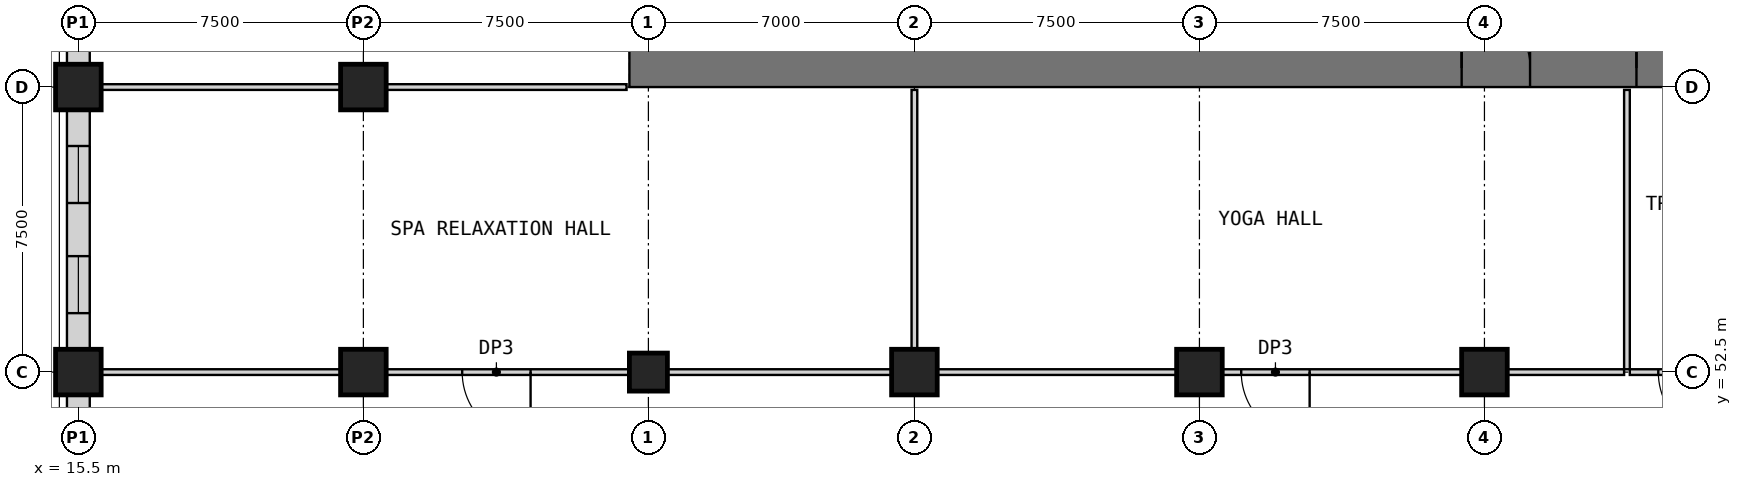
"""IFC4 building model, lengths in metres.
Left out: names, types, materials, properties, quantities, classifications, styles, units other than length and angle.
Written with IfcOpenShell. Run it as: python <this file> out.ifc"""

import sys

from ifc_helpers import new_model, si_unit, direction, frame, frame_2d, origin, origin_2d, place, context, subcontext, project, spatial, rectangle, extrude, element, fill, save


model = new_model("IFC4")
c1 = context("Model", 3, precision=1e-05, world=origin(), true_north=direction((0.0, 1.0)))
c2 = subcontext(c1, "Body", "Model", "MODEL_VIEW")
j1 = project(units=[si_unit("LENGTHUNIT", "METRE"), si_unit("PLANEANGLEUNIT", "RADIAN")], contexts=[c1])
p1 = place(None, origin())
s1 = spatial("IfcSite", under=j1, at=p1, CompositionType="ELEMENT")
p2 = place(p1, origin())
s2 = spatial("IfcBuilding", under=s1, at=p2, CompositionType="ELEMENT")
p3 = place(p2, frame((0.0, 0.0, 29.0)))
s3 = spatial("IfcBuildingStorey", under=s2, at=p3, CompositionType="ELEMENT", Elevation=29.0)
p4 = place(p3, frame((30.5, 52.5, 0.0), z_axis=(0.0, 0.0, 1.0), x_axis=(1.0, 0.0, 0.0)))
e1 = element("IfcColumn", 1, at=p4, inside=s3, PredefinedType="COLUMN", context=c2, shape_type="SweptSolid", body=[
    extrude(rectangle(XDim=1.0, YDim=1.0, at=origin_2d()), origin(), (0.0, 0.0, 1.0), 5.0),
])
for number, where, z_axis, x_axis in (
    (2, (37.5, 52.5, 0.0), (0.0, 0.0, 1.0), (1.0, 0.0, 0.0)),
    (3, (45.0, 52.5, 0.0), (0.0, 0.0, 1.0), (1.0, 0.0, 0.0)),
    (4, (52.5, 52.5, 0.0), (0.0, 0.0, 1.0), (1.0, 0.0, 0.0)),
    (5, (15.5, 52.5, 0.0), (0.0, 0.0, 1.0), (1.0, 0.0, 0.0)),
    (6, (15.5, 60.0, 0.0), (0.0, 0.0, 1.0), (1.0, 0.0, 0.0)),
    (7, (23.0, 52.5, 0.0), (0.0, 0.0, 1.0), (1.0, 0.0, 0.0)),
    (8, (23.0, 60.0, 0.0), (0.0, 0.0, 1.0), (1.0, 0.0, 0.0)),
):
    element("IfcColumn", number, at=place(p3, frame(where, z_axis=z_axis, x_axis=x_axis)), inside=s3, PredefinedType="COLUMN", context=c2, shape_type="SweptSolid", body=[
        extrude(rectangle(XDim=1.2, YDim=1.2, at=origin_2d()), origin(), (0.0, 0.0, 1.0), 5.0),
    ])
p5 = place(p3, frame((30.0, 60.5, 0.0), z_axis=(0.0, 0.0, 1.0), x_axis=(1.0, 0.0, 0.0)))
e9 = element("IfcWall", 9, at=p5, inside=s3, PredefinedType="SHEAR", context=c2, shape_type="SweptSolid", body=[
    extrude(rectangle(XDim=30.0, YDim=1.0, at=frame_2d((15.0, 0.0))), origin(), (0.0, 0.0, 1.0), 5.0),
])
p6 = place(p5, frame((21.9, 0.0, 0.0)))
e10 = element("IfcOpeningElement", 10, at=p6, cuts=e9, PredefinedType="OPENING", context=c2, shape_type="SweptSolid", body=[
    extrude(rectangle(XDim=1.8, YDim=2.1, at=frame_2d((0.9, 1.05))), frame((0.0, 0.51, 0.0), z_axis=(0.0, -1.0, 0.0), x_axis=(1.0, 0.0, 0.0)), (0.0, 0.0, 1.0), 1.02),
])
p7 = place(p5, frame((26.5, 0.0, 0.0)))
e11 = element("IfcOpeningElement", 11, at=p7, cuts=e9, PredefinedType="OPENING", context=c2, shape_type="SweptSolid", body=[
    extrude(rectangle(XDim=1.2, YDim=2.1, at=frame_2d((0.6, 1.05))), frame((0.0, 0.51, 0.0), z_axis=(0.0, -1.0, 0.0), x_axis=(1.0, 0.0, 0.0)), (0.0, 0.0, 1.0), 1.02),
])
p8 = place(p3, frame((16.1, 52.5, 0.0), z_axis=(0.0, 0.0, 1.0), x_axis=(1.0, 0.0, 0.0)))
e12 = element("IfcWall", 12, at=p8, inside=s3, PredefinedType="PARTITIONING", context=c2, shape_type="SweptSolid", body=[
    extrude(rectangle(XDim=6.3, YDim=0.15, at=frame_2d((3.15, 0.0))), origin(), (0.0, 0.0, 1.0), 4.7),
])
p9 = place(p3, frame((30.0, 52.5, 0.0), z_axis=(0.0, 0.0, 1.0), x_axis=(-1.0, 0.0, 0.0)))
e13 = element("IfcWall", 13, at=p9, inside=s3, PredefinedType="PARTITIONING", context=c2, shape_type="SweptSolid", body=[
    extrude(rectangle(XDim=6.4, YDim=0.15, at=frame_2d((3.2, 0.0))), origin(), (0.0, 0.0, 1.0), 4.7),
])
p10 = place(p9, frame((2.6, 0.0, 0.0)))
e14 = element("IfcOpeningElement", 14, at=p10, cuts=e13, PredefinedType="OPENING", context=c2, shape_type="SweptSolid", body=[
    extrude(rectangle(XDim=1.8, YDim=2.4, at=frame_2d((0.9, 1.2))), frame((0.0, 0.085, 0.0), z_axis=(0.0, -1.0, 0.0), x_axis=(1.0, 0.0, 0.0)), (0.0, 0.0, 1.0), 0.17),
])
p11 = place(p3, frame((31.0, 52.5, 0.0), z_axis=(0.0, 0.0, 1.0), x_axis=(1.0, 0.0, 0.0)))
e15 = element("IfcWall", 15, at=p11, inside=s3, PredefinedType="PARTITIONING", context=c2, shape_type="SweptSolid", body=[
    extrude(rectangle(XDim=5.9, YDim=0.15, at=frame_2d((2.95, 0.0))), origin(), (0.0, 0.0, 1.0), 4.7),
])
p12 = place(p3, frame((38.1, 52.5, 0.0), z_axis=(0.0, 0.0, 1.0), x_axis=(1.0, 0.0, 0.0)))
e16 = element("IfcWall", 16, at=p12, inside=s3, PredefinedType="PARTITIONING", context=c2, shape_type="SweptSolid", body=[
    extrude(rectangle(XDim=6.3, YDim=0.15, at=frame_2d((3.15, 0.0))), origin(), (0.0, 0.0, 1.0), 4.7),
])
p13 = place(p3, frame((51.9, 52.5, 0.0), z_axis=(0.0, 0.0, 1.0), x_axis=(-1.0, 0.0, 0.0)))
e17 = element("IfcWall", 17, at=p13, inside=s3, PredefinedType="PARTITIONING", context=c2, shape_type="SweptSolid", body=[
    extrude(rectangle(XDim=6.3, YDim=0.15, at=frame_2d((3.15, 0.0))), origin(), (0.0, 0.0, 1.0), 4.7),
])
p14 = place(p13, frame((4.0, 0.0, 0.0)))
e18 = element("IfcOpeningElement", 18, at=p14, cuts=e17, PredefinedType="OPENING", context=c2, shape_type="SweptSolid", body=[
    extrude(rectangle(XDim=1.8, YDim=2.4, at=frame_2d((0.9, 1.2))), frame((0.0, 0.085, 0.0), z_axis=(0.0, -1.0, 0.0), x_axis=(1.0, 0.0, 0.0)), (0.0, 0.0, 1.0), 0.17),
])
p15 = place(p3, frame((53.1, 52.5, 0.0), z_axis=(0.0, 0.0, 1.0), x_axis=(1.0, 0.0, 0.0)))
e19 = element("IfcWall", 19, at=p15, inside=s3, PredefinedType="PARTITIONING", context=c2, shape_type="SweptSolid", body=[
    extrude(rectangle(XDim=3.075, YDim=0.15, at=frame_2d((1.538, 0.0))), origin(), (0.0, 0.0, 1.0), 4.7),
])
p16 = place(p3, frame((59.4, 52.5, 0.0), z_axis=(0.0, 0.0, 1.0), x_axis=(-1.0, 0.0, 0.0)))
e20 = element("IfcWall", 20, at=p16, inside=s3, PredefinedType="PARTITIONING", context=c2, shape_type="SweptSolid", body=[
    extrude(rectangle(XDim=3.075, YDim=0.15, at=frame_2d((1.538, 0.0))), origin(), (0.0, 0.0, 1.0), 4.7),
])
p17 = place(p16, frame((0.525, 0.0, 0.0)))
e21 = element("IfcOpeningElement", 21, at=p17, cuts=e20, PredefinedType="OPENING", context=c2, shape_type="SweptSolid", body=[
    extrude(rectangle(XDim=1.8, YDim=2.4, at=frame_2d((0.9, 1.2))), frame((0.0, 0.085, 0.0), z_axis=(0.0, -1.0, 0.0), x_axis=(1.0, 0.0, 0.0)), (0.0, 0.0, 1.0), 0.17),
])
p18 = place(p3, frame((16.1, 60.0, 0.0), z_axis=(0.0, 0.0, 1.0), x_axis=(1.0, 0.0, 0.0)))
e22 = element("IfcWall", 22, at=p18, inside=s3, PredefinedType="PARTITIONING", context=c2, shape_type="SweptSolid", body=[
    extrude(rectangle(XDim=6.3, YDim=0.15, at=frame_2d((3.15, 0.0))), origin(), (0.0, 0.0, 1.0), 4.7),
])
p19 = place(p3, frame((23.6, 60.0, 0.0), z_axis=(0.0, 0.0, 1.0), x_axis=(1.0, 0.0, 0.0)))
e23 = element("IfcWall", 23, at=p19, inside=s3, PredefinedType="PARTITIONING", context=c2, shape_type="SweptSolid", body=[
    extrude(rectangle(XDim=6.325, YDim=0.15, at=frame_2d((3.163, 0.0))), origin(), (0.0, 0.0, 1.0), 4.7),
])
p20 = place(p3, frame((15.5, 46.1, 0.0), z_axis=(0.0, 0.0, 1.0), x_axis=(0.0, 1.0, 0.0)))
e24 = element("IfcWall", 24, at=p20, inside=s3, PredefinedType="PARTITIONING", context=c2, shape_type="SweptSolid", body=[
    extrude(rectangle(XDim=5.8, YDim=0.6, at=frame_2d((2.9, 0.0))), origin(), (0.0, 0.0, 1.0), 4.7),
])
p21 = place(p20, frame((0.816, 0.0, 0.9)))
e25 = element("IfcOpeningElement", 25, at=p21, cuts=e24, PredefinedType="OPENING", context=c2, shape_type="SweptSolid", body=[
    extrude(rectangle(XDim=1.5, YDim=2.8, at=frame_2d((0.75, 1.4))), frame((0.0, 0.31, 0.0), z_axis=(0.0, -1.0, 0.0), x_axis=(1.0, 0.0, 0.0)), (0.0, 0.0, 1.0), 0.62),
])
p22 = place(p20, frame((3.484, 0.0, 0.9)))
e26 = element("IfcOpeningElement", 26, at=p22, cuts=e24, PredefinedType="OPENING", context=c2, shape_type="SweptSolid", body=[
    extrude(rectangle(XDim=1.5, YDim=2.8, at=frame_2d((0.75, 1.4))), frame((0.0, 0.31, 0.0), z_axis=(0.0, -1.0, 0.0), x_axis=(1.0, 0.0, 0.0)), (0.0, 0.0, 1.0), 0.62),
])
p23 = place(p3, frame((15.5, 53.1, 0.0), z_axis=(0.0, 0.0, 1.0), x_axis=(0.0, 1.0, 0.0)))
e27 = element("IfcWall", 27, at=p23, inside=s3, PredefinedType="PARTITIONING", context=c2, shape_type="SweptSolid", body=[
    extrude(rectangle(XDim=6.3, YDim=0.6, at=frame_2d((3.15, 0.0))), origin(), (0.0, 0.0, 1.0), 4.7),
])
p24 = place(p23, frame((0.951, 0.0, 0.9)))
e28 = element("IfcOpeningElement", 28, at=p24, cuts=e27, PredefinedType="OPENING", context=c2, shape_type="SweptSolid", body=[
    extrude(rectangle(XDim=1.5, YDim=2.8, at=frame_2d((0.75, 1.4))), frame((0.0, 0.31, 0.0), z_axis=(0.0, -1.0, 0.0), x_axis=(1.0, 0.0, 0.0)), (0.0, 0.0, 1.0), 0.62),
])
p25 = place(p23, frame((3.849, 0.0, 0.9)))
e29 = element("IfcOpeningElement", 29, at=p25, cuts=e27, PredefinedType="OPENING", context=c2, shape_type="SweptSolid", body=[
    extrude(rectangle(XDim=1.5, YDim=2.8, at=frame_2d((0.75, 1.4))), frame((0.0, 0.31, 0.0), z_axis=(0.0, -1.0, 0.0), x_axis=(1.0, 0.0, 0.0)), (0.0, 0.0, 1.0), 0.62),
])
p26 = place(p3, frame((15.5, 60.6, 0.0), z_axis=(0.0, 0.0, 1.0), x_axis=(0.0, 1.0, 0.0)))
e30 = element("IfcWall", 30, at=p26, inside=s3, PredefinedType="PARTITIONING", context=c2, shape_type="SweptSolid", body=[
    extrude(rectangle(XDim=6.3, YDim=0.6, at=frame_2d((3.15, 0.0))), origin(), (0.0, 0.0, 1.0), 4.7),
])
p27 = place(p26, frame((0.951, 0.0, 0.9)))
e31 = element("IfcOpeningElement", 31, at=p27, cuts=e30, PredefinedType="OPENING", context=c2, shape_type="SweptSolid", body=[
    extrude(rectangle(XDim=1.5, YDim=2.8, at=frame_2d((0.75, 1.4))), frame((0.0, 0.31, 0.0), z_axis=(0.0, -1.0, 0.0), x_axis=(1.0, 0.0, 0.0)), (0.0, 0.0, 1.0), 0.62),
])
p28 = place(p26, frame((3.849, 0.0, 0.9)))
e32 = element("IfcOpeningElement", 32, at=p28, cuts=e30, PredefinedType="OPENING", context=c2, shape_type="SweptSolid", body=[
    extrude(rectangle(XDim=1.5, YDim=2.8, at=frame_2d((0.75, 1.4))), frame((0.0, 0.31, 0.0), z_axis=(0.0, -1.0, 0.0), x_axis=(1.0, 0.0, 0.0)), (0.0, 0.0, 1.0), 0.62),
])
p29 = place(p3, frame((56.25, 52.575, 0.0), z_axis=(0.0, 0.0, 1.0), x_axis=(0.0, 1.0, 0.0)))
e33 = element("IfcWall", 33, at=p29, inside=s3, PredefinedType="PARTITIONING", context=c2, shape_type="SweptSolid", body=[
    extrude(rectangle(XDim=7.35, YDim=0.15, at=frame_2d((3.675, 0.0))), origin(), (0.0, 0.0, 1.0), 4.7),
])
p30 = place(p3, frame((37.5, 53.1, 0.0), z_axis=(0.0, 0.0, 1.0), x_axis=(0.0, 1.0, 0.0)))
e34 = element("IfcWall", 34, at=p30, inside=s3, PredefinedType="PARTITIONING", context=c2, shape_type="SweptSolid", body=[
    extrude(rectangle(XDim=6.825, YDim=0.15, at=frame_2d((3.413, 0.0))), origin(), (0.0, 0.0, 1.0), 4.7),
])
p31 = place(p6, origin())
e35 = element("IfcDoor", 35, at=p31, inside=s3, OperationType="DOUBLE_DOOR_SINGLE_SWING", PredefinedType="DOOR", context=c2, shape_type="SweptSolid", body=[
    extrude(rectangle(XDim=1.8, YDim=2.1, at=frame_2d((0.9, 1.05))), frame((0.0, 0.025, 0.0), z_axis=(0.0, -1.0, 0.0), x_axis=(1.0, 0.0, 0.0)), (0.0, 0.0, 1.0), 0.05),
])
fill(e10, e35)
p32 = place(p7, origin())
e36 = element("IfcDoor", 36, at=p32, inside=s3, OperationType="SINGLE_SWING_LEFT", PredefinedType="DOOR", context=c2, shape_type="SweptSolid", body=[
    extrude(rectangle(XDim=1.2, YDim=2.1, at=frame_2d((0.6, 1.05))), frame((0.0, 0.025, 0.0), z_axis=(0.0, -1.0, 0.0), x_axis=(1.0, 0.0, 0.0)), (0.0, 0.0, 1.0), 0.05),
])
fill(e11, e36)
p33 = place(p10, origin())
e37 = element("IfcDoor", 37, at=p33, inside=s3, OperationType="SINGLE_SWING_LEFT", PredefinedType="DOOR", context=c2, shape_type="SweptSolid", body=[
    extrude(rectangle(XDim=1.8, YDim=2.4, at=frame_2d((0.9, 1.2))), frame((0.0, 0.025, 0.0), z_axis=(0.0, -1.0, 0.0), x_axis=(1.0, 0.0, 0.0)), (0.0, 0.0, 1.0), 0.05),
])
fill(e14, e37)
p34 = place(p14, origin())
e38 = element("IfcDoor", 38, at=p34, inside=s3, OperationType="SINGLE_SWING_LEFT", PredefinedType="DOOR", context=c2, shape_type="SweptSolid", body=[
    extrude(rectangle(XDim=1.8, YDim=2.4, at=frame_2d((0.9, 1.2))), frame((0.0, 0.025, 0.0), z_axis=(0.0, -1.0, 0.0), x_axis=(1.0, 0.0, 0.0)), (0.0, 0.0, 1.0), 0.05),
])
fill(e18, e38)
p35 = place(p17, origin())
e39 = element("IfcDoor", 39, at=p35, inside=s3, OperationType="SINGLE_SWING_LEFT", PredefinedType="DOOR", context=c2, shape_type="SweptSolid", body=[
    extrude(rectangle(XDim=1.8, YDim=2.4, at=frame_2d((0.9, 1.2))), frame((0.0, 0.025, 0.0), z_axis=(0.0, -1.0, 0.0), x_axis=(1.0, 0.0, 0.0)), (0.0, 0.0, 1.0), 0.05),
])
fill(e21, e39)
p36 = place(p24, origin())
e40 = element("IfcWindow", 40, at=p36, inside=s3, PartitioningType="SINGLE_PANEL", PredefinedType="WINDOW", context=c2, shape_type="SweptSolid", body=[
    extrude(rectangle(XDim=1.5, YDim=2.8, at=frame_2d((0.75, 1.4))), frame((0.0, 0.03, 0.0), z_axis=(0.0, -1.0, 0.0), x_axis=(1.0, 0.0, 0.0)), (0.0, 0.0, 1.0), 0.06),
])
fill(e28, e40)
p37 = place(p25, origin())
e41 = element("IfcWindow", 41, at=p37, inside=s3, PartitioningType="SINGLE_PANEL", PredefinedType="WINDOW", context=c2, shape_type="SweptSolid", body=[
    extrude(rectangle(XDim=1.5, YDim=2.8, at=frame_2d((0.75, 1.4))), frame((0.0, 0.03, 0.0), z_axis=(0.0, -1.0, 0.0), x_axis=(1.0, 0.0, 0.0)), (0.0, 0.0, 1.0), 0.06),
])
fill(e29, e41)
save(model, sys.argv[1])
